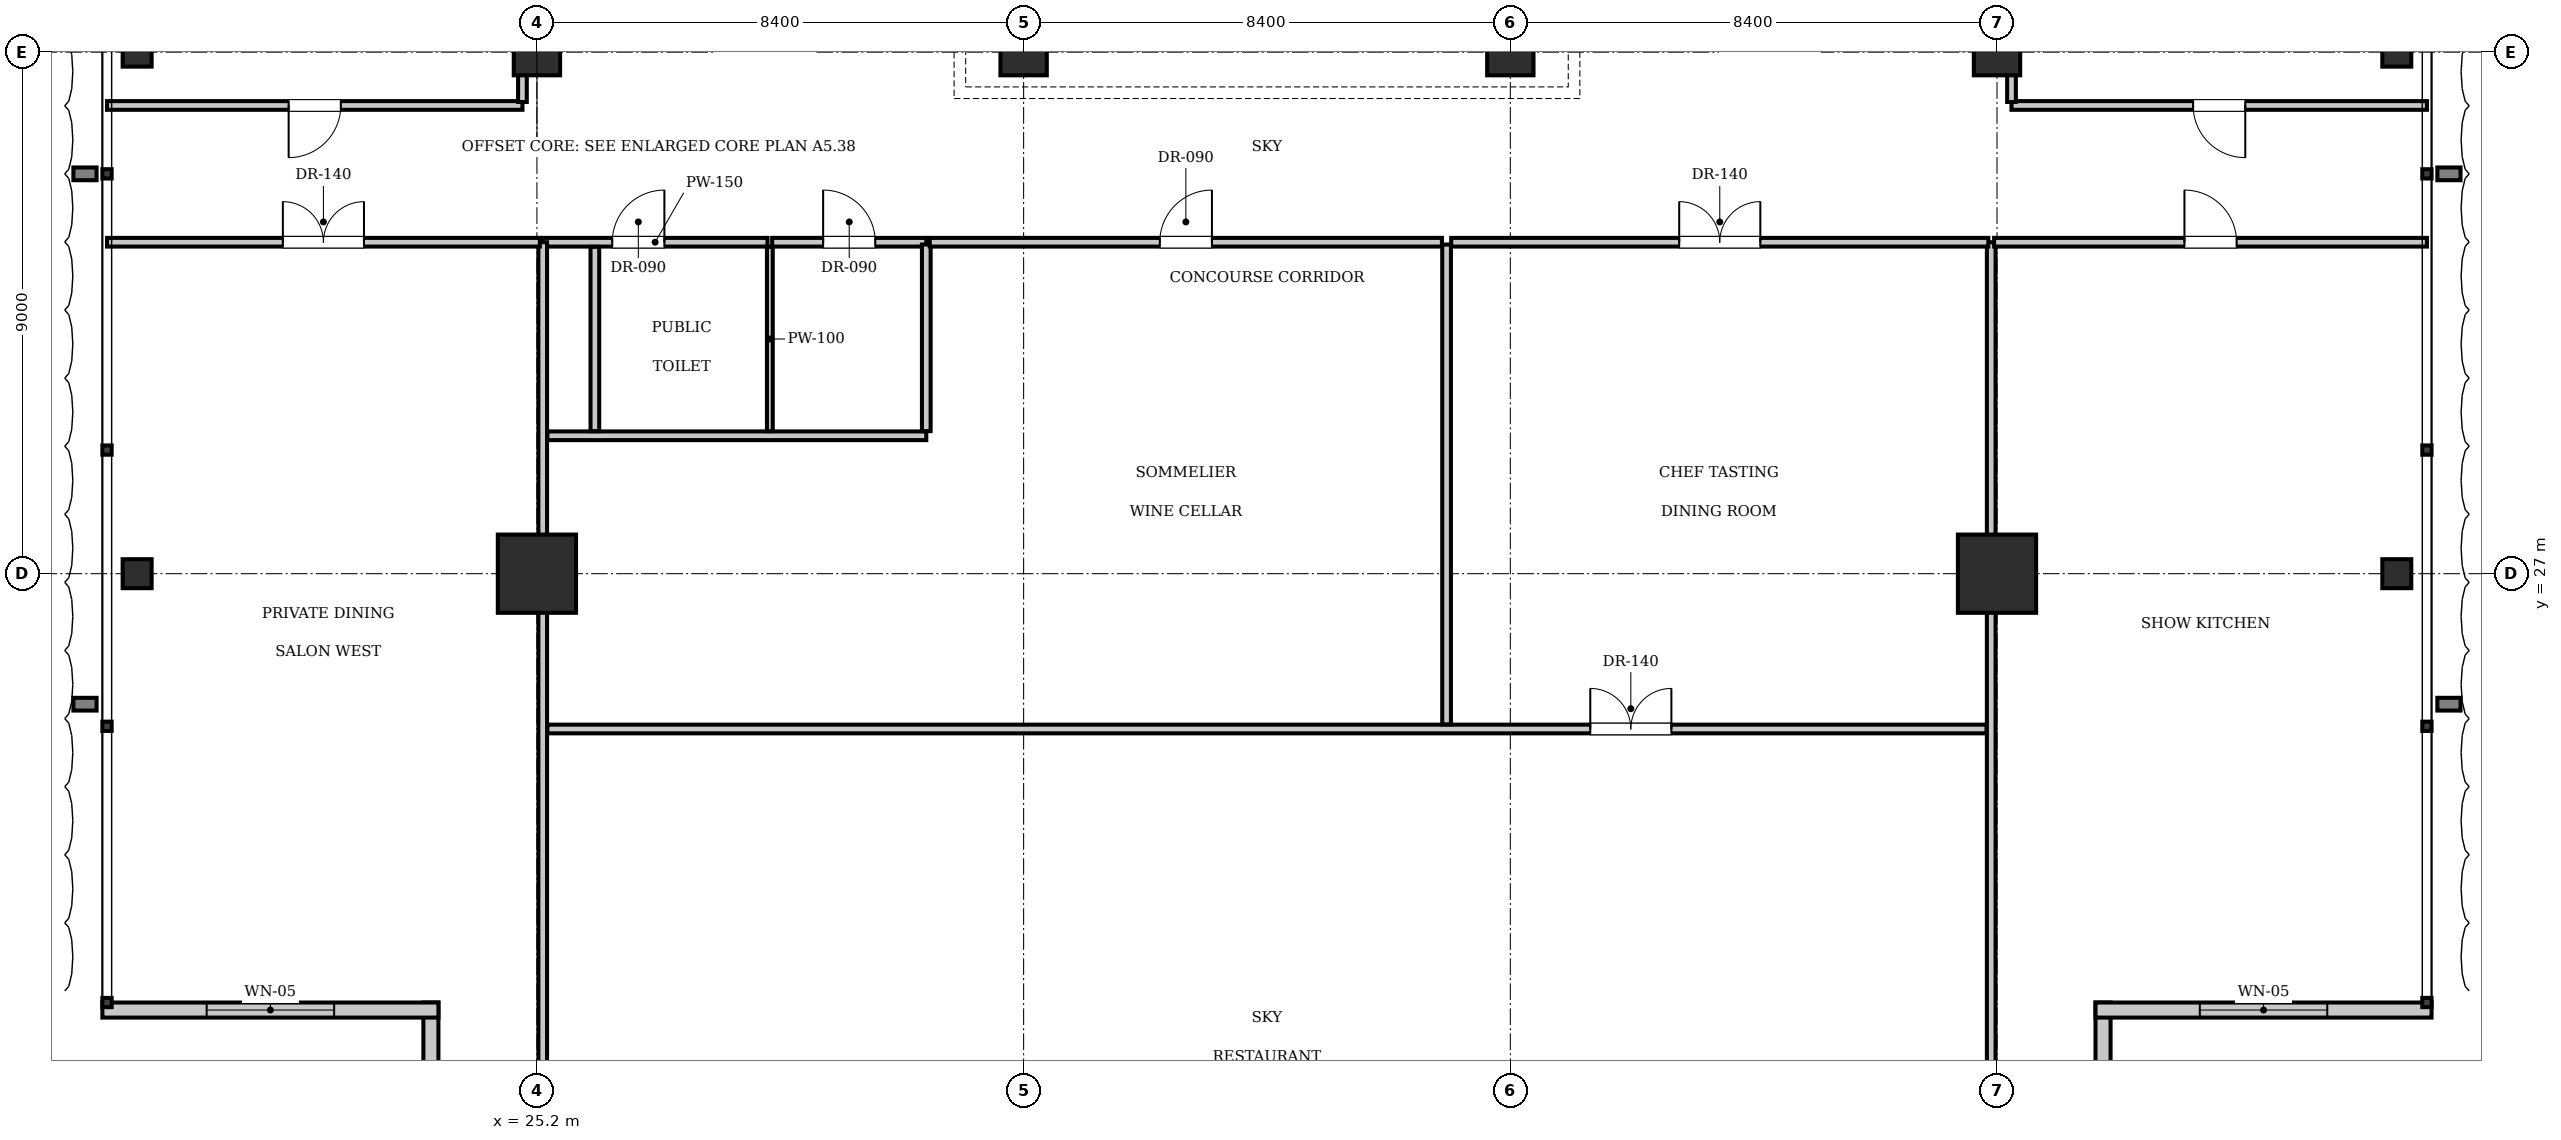
"""IFC4 building model, lengths in metres.
Left out: names, types, materials, properties, quantities, classifications, styles, units other than length and angle.
Written with IfcOpenShell. Run it as: python <this file> out.ifc"""

import sys

from ifc_helpers import new_model, si_unit, direction, frame, frame_2d, origin, origin_2d, place, context, subcontext, project, spatial, rectangle, i_section, extrude, element, fill, save


model = new_model("IFC4")
c1 = context("Model", 3, precision=1e-05, world=origin(), true_north=direction((0.0, 1.0)))
c2 = subcontext(c1, "Body", "Model", "MODEL_VIEW")
j1 = project(units=[si_unit("LENGTHUNIT", "METRE"), si_unit("PLANEANGLEUNIT", "RADIAN")], contexts=[c1])
p1 = place(None, origin())
s1 = spatial("IfcSite", under=j1, at=p1, CompositionType="ELEMENT")
p2 = place(p1, origin())
s2 = spatial("IfcBuilding", under=s1, at=p2, CompositionType="ELEMENT")
p3 = place(p2, frame((0.0, 0.0, 345.1)))
s3 = spatial("IfcBuildingStorey", under=s2, at=p3, CompositionType="ELEMENT", Elevation=345.1)
for number, where, z_axis, x_axis in (
    (1, (25.2, 27.0, 0.0), (0.0, 0.0, 1.0), (1.0, 0.0, 0.0)),
    (2, (50.4, 27.0, 0.0), (0.0, 0.0, 1.0), (1.0, 0.0, 0.0)),
):
    element("IfcColumn", number, at=place(p3, frame(where, z_axis=z_axis, x_axis=x_axis)), inside=s3, PredefinedType="COLUMN", context=c2, shape_type="SweptSolid", body=[
        extrude(rectangle(XDim=1.35, YDim=1.35, at=origin_2d()), origin(), (0.0, 0.0, 1.0), 4.55),
    ])
for number, where, z_axis, x_axis in (
    (3, (25.2, 36.0, 0.0), (0.0, 0.0, 1.0), (1.0, 0.0, 0.0)),
    (4, (33.6, 36.0, 0.0), (0.0, 0.0, 1.0), (1.0, 0.0, 0.0)),
    (5, (42.0, 36.0, 0.0), (0.0, 0.0, 1.0), (1.0, 0.0, 0.0)),
    (6, (50.4, 36.0, 0.0), (0.0, 0.0, 1.0), (1.0, 0.0, 0.0)),
):
    element("IfcColumn", number, at=place(p3, frame(where, z_axis=z_axis, x_axis=x_axis)), inside=s3, PredefinedType="COLUMN", context=c2, shape_type="SweptSolid", body=[
        extrude(rectangle(XDim=0.8, YDim=0.8, at=origin_2d()), origin(), (0.0, 0.0, 1.0), 4.55),
    ])
for number, where, z_axis, x_axis in (
    (7, (18.3, 27.0, 0.0), (0.0, 0.0, 1.0), (1.0, 0.0, 0.0)),
    (8, (57.3, 27.0, 0.0), (0.0, 0.0, 1.0), (1.0, 0.0, 0.0)),
    (9, (18.3, 36.0, 0.0), (0.0, 0.0, 1.0), (1.0, 0.0, 0.0)),
    (10, (57.3, 36.0, 0.0), (0.0, 0.0, 1.0), (1.0, 0.0, 0.0)),
):
    element("IfcColumn", number, at=place(p3, frame(where, z_axis=z_axis, x_axis=x_axis)), inside=s3, PredefinedType="COLUMN", context=c2, shape_type="SweptSolid", body=[
        extrude(i_section(OverallWidth=0.5, OverallDepth=0.5, WebThickness=0.022, FlangeThickness=0.032, at=origin_2d()), origin(), (0.0, 0.0, 1.0), 4.55),
    ])
p4 = place(p3, frame((23.37, 13.8, 0.0), z_axis=(0.0, 0.0, 1.0), x_axis=(0.0, 1.0, 0.0)))
e11 = element("IfcWall", 11, at=p4, inside=s3, PredefinedType="SOLIDWALL", context=c2, shape_type="SweptSolid", body=[
    extrude(rectangle(XDim=5.8, YDim=0.26, at=frame_2d((2.9, 0.0))), origin(), (0.0, 0.0, 1.0), 4.31),
])
p5 = place(p3, frame((23.5, 19.47, 0.0), z_axis=(0.0, 0.0, 1.0), x_axis=(-1.0, 0.0, 0.0)))
e12 = element("IfcWall", 12, at=p5, inside=s3, PredefinedType="SOLIDWALL", context=c2, shape_type="SweptSolid", body=[
    extrude(rectangle(XDim=5.8, YDim=0.26, at=frame_2d((2.9, 0.0))), origin(), (0.0, 0.0, 1.0), 4.31),
])
p6 = place(p5, frame((1.8, 0.0, 0.9)))
e13 = element("IfcOpeningElement", 13, at=p6, cuts=e12, PredefinedType="OPENING", context=c2, shape_type="SweptSolid", body=[
    extrude(rectangle(XDim=2.2, YDim=2.8, at=frame_2d((1.1, 1.4))), frame((0.0, 0.14, 0.0), z_axis=(0.0, -1.0, 0.0), x_axis=(1.0, 0.0, 0.0)), (0.0, 0.0, 1.0), 0.28),
])
p7 = place(p3, frame((52.23, 19.6, 0.0), z_axis=(0.0, 0.0, 1.0), x_axis=(0.0, -1.0, 0.0)))
e14 = element("IfcWall", 14, at=p7, inside=s3, PredefinedType="SOLIDWALL", context=c2, shape_type="SweptSolid", body=[
    extrude(rectangle(XDim=5.8, YDim=0.26, at=frame_2d((2.9, 0.0))), origin(), (0.0, 0.0, 1.0), 4.31),
])
p8 = place(p3, frame((57.9, 19.47, 0.0), z_axis=(0.0, 0.0, 1.0), x_axis=(-1.0, 0.0, 0.0)))
e15 = element("IfcWall", 15, at=p8, inside=s3, PredefinedType="SOLIDWALL", context=c2, shape_type="SweptSolid", body=[
    extrude(rectangle(XDim=5.8, YDim=0.26, at=frame_2d((2.9, 0.0))), origin(), (0.0, 0.0, 1.0), 4.31),
])
p9 = place(p8, frame((1.8, 0.0, 0.9)))
e16 = element("IfcOpeningElement", 16, at=p9, cuts=e15, PredefinedType="OPENING", context=c2, shape_type="SweptSolid", body=[
    extrude(rectangle(XDim=2.2, YDim=2.8, at=frame_2d((1.1, 1.4))), frame((0.0, 0.14, 0.0), z_axis=(0.0, -1.0, 0.0), x_axis=(1.0, 0.0, 0.0)), (0.0, 0.0, 1.0), 0.28),
])
p10 = place(p3, frame((25.3, 32.72, 0.0), z_axis=(0.0, 0.0, 1.0), x_axis=(1.0, 0.0, 0.0)))
e17 = element("IfcWall", 17, at=p10, inside=s3, PredefinedType="PARTITIONING", context=c2, shape_type="SweptSolid", body=[
    extrude(rectangle(XDim=3.88, YDim=0.15, at=frame_2d((1.94, 0.0))), origin(), (0.0, 0.0, 1.0), 4.31),
])
p11 = place(p10, frame((1.2, 0.0, 0.0)))
e18 = element("IfcOpeningElement", 18, at=p11, cuts=e17, PredefinedType="OPENING", context=c2, shape_type="SweptSolid", body=[
    extrude(rectangle(XDim=0.9, YDim=2.1, at=frame_2d((0.45, 1.05))), frame((0.0, 0.085, 0.0), z_axis=(0.0, -1.0, 0.0), x_axis=(1.0, 0.0, 0.0)), (0.0, 0.0, 1.0), 0.17),
])
p12 = place(p3, frame((29.26, 32.72, 0.0), z_axis=(0.0, 0.0, 1.0), x_axis=(1.0, 0.0, 0.0)))
e19 = element("IfcWall", 19, at=p12, inside=s3, PredefinedType="PARTITIONING", context=c2, shape_type="SweptSolid", body=[
    extrude(rectangle(XDim=2.66, YDim=0.15, at=frame_2d((1.33, 0.0))), origin(), (0.0, 0.0, 1.0), 4.31),
])
p13 = place(p12, frame((0.88, 0.0, 0.0)))
e20 = element("IfcOpeningElement", 20, at=p13, cuts=e19, PredefinedType="OPENING", context=c2, shape_type="SweptSolid", body=[
    extrude(rectangle(XDim=0.9, YDim=2.1, at=frame_2d((0.45, 1.05))), frame((0.0, 0.085, 0.0), z_axis=(0.0, -1.0, 0.0), x_axis=(1.0, 0.0, 0.0)), (0.0, 0.0, 1.0), 0.17),
])
p14 = place(p3, frame((25.38, 29.38, 0.0), z_axis=(0.0, 0.0, 1.0), x_axis=(1.0, 0.0, 0.0)))
e21 = element("IfcWall", 21, at=p14, inside=s3, PredefinedType="PARTITIONING", context=c2, shape_type="SweptSolid", body=[
    extrude(rectangle(XDim=6.54, YDim=0.15, at=frame_2d((3.27, 0.0))), origin(), (0.0, 0.0, 1.0), 4.31),
])
p15 = place(p3, frame((26.2, 29.46, 0.0), z_axis=(0.0, 0.0, 1.0), x_axis=(0.0, 1.0, 0.0)))
e22 = element("IfcWall", 22, at=p15, inside=s3, PredefinedType="PARTITIONING", context=c2, shape_type="SweptSolid", body=[
    extrude(rectangle(XDim=3.18, YDim=0.15, at=frame_2d((1.59, 0.0))), origin(), (0.0, 0.0, 1.0), 4.31),
])
p16 = place(p3, frame((29.22, 29.46, 0.0), z_axis=(0.0, 0.0, 1.0), x_axis=(0.0, 1.0, 0.0)))
e23 = element("IfcWall", 23, at=p16, inside=s3, PredefinedType="PARTITIONING", context=c2, shape_type="SweptSolid", body=[
    extrude(rectangle(XDim=3.18, YDim=0.1, at=frame_2d((1.59, 0.0))), origin(), (0.0, 0.0, 1.0), 4.31),
])
p17 = place(p3, frame((31.92, 29.46, 0.0), z_axis=(0.0, 0.0, 1.0), x_axis=(0.0, 1.0, 0.0)))
e24 = element("IfcWall", 24, at=p17, inside=s3, PredefinedType="PARTITIONING", context=c2, shape_type="SweptSolid", body=[
    extrude(rectangle(XDim=3.22, YDim=0.15, at=frame_2d((1.61, 0.0))), origin(), (0.0, 0.0, 1.0), 4.31),
])
p18 = place(p3, frame((25.38, 24.32, 0.0), z_axis=(0.0, 0.0, 1.0), x_axis=(1.0, 0.0, 0.0)))
e25 = element("IfcWall", 25, at=p18, inside=s3, PredefinedType="PARTITIONING", context=c2, shape_type="SweptSolid", body=[
    extrude(rectangle(XDim=24.84, YDim=0.15, at=frame_2d((12.42, 0.0))), origin(), (0.0, 0.0, 1.0), 4.31),
])
p19 = place(p18, frame((18.0, 0.0, 0.0)))
e26 = element("IfcOpeningElement", 26, at=p19, cuts=e25, PredefinedType="OPENING", context=c2, shape_type="SweptSolid", body=[
    extrude(rectangle(XDim=1.4, YDim=2.2, at=frame_2d((0.7, 1.1))), frame((0.0, 0.085, 0.0), z_axis=(0.0, -1.0, 0.0), x_axis=(1.0, 0.0, 0.0)), (0.0, 0.0, 1.0), 0.17),
])
p20 = place(p3, frame((40.9, 24.4, 0.0), z_axis=(0.0, 0.0, 1.0), x_axis=(0.0, 1.0, 0.0)))
e27 = element("IfcWall", 27, at=p20, inside=s3, PredefinedType="PARTITIONING", context=c2, shape_type="SweptSolid", body=[
    extrude(rectangle(XDim=8.28, YDim=0.15, at=frame_2d((4.14, 0.0))), origin(), (0.0, 0.0, 1.0), 4.31),
])
for number, where, z_axis, x_axis in (
    (28, (25.3, 13.88, 0.0), (0.0, 0.0, 1.0), (0.0, 1.0, 0.0)),
    (29, (50.3, 13.88, 0.0), (0.0, 0.0, 1.0), (0.0, 1.0, 0.0)),
):
    element("IfcWall", number, at=place(p3, frame(where, z_axis=z_axis, x_axis=x_axis)), inside=s3, PredefinedType="PARTITIONING", context=c2, shape_type="SweptSolid", body=[
        extrude(rectangle(XDim=18.84, YDim=0.15, at=frame_2d((9.42, 0.0))), origin(), (0.0, 0.0, 1.0), 3.841),
    ])
p21 = place(p3, frame((17.78, 32.72, 0.0), z_axis=(0.0, 0.0, 1.0), x_axis=(1.0, 0.0, 0.0)))
e30 = element("IfcWall", 30, at=p21, inside=s3, PredefinedType="PARTITIONING", context=c2, shape_type="SweptSolid", body=[
    extrude(rectangle(XDim=7.47, YDim=0.15, at=frame_2d((3.735, 0.0))), origin(), (0.0, 0.0, 1.0), 4.31),
])
p22 = place(p21, frame((3.035, 0.0, 0.0)))
e31 = element("IfcOpeningElement", 31, at=p22, cuts=e30, PredefinedType="OPENING", context=c2, shape_type="SweptSolid", body=[
    extrude(rectangle(XDim=1.4, YDim=2.2, at=frame_2d((0.7, 1.1))), frame((0.0, 0.085, 0.0), z_axis=(0.0, -1.0, 0.0), x_axis=(1.0, 0.0, 0.0)), (0.0, 0.0, 1.0), 0.17),
])
p23 = place(p3, frame((31.98, 32.72, 0.0), z_axis=(0.0, 0.0, 1.0), x_axis=(1.0, 0.0, 0.0)))
e32 = element("IfcWall", 32, at=p23, inside=s3, PredefinedType="PARTITIONING", context=c2, shape_type="SweptSolid", body=[
    extrude(rectangle(XDim=8.84, YDim=0.15, at=frame_2d((4.42, 0.0))), origin(), (0.0, 0.0, 1.0), 4.31),
])
p24 = place(p23, frame((3.97, 0.0, 0.0)))
e33 = element("IfcOpeningElement", 33, at=p24, cuts=e32, PredefinedType="OPENING", context=c2, shape_type="SweptSolid", body=[
    extrude(rectangle(XDim=0.9, YDim=2.1, at=frame_2d((0.45, 1.05))), frame((0.0, 0.085, 0.0), z_axis=(0.0, -1.0, 0.0), x_axis=(1.0, 0.0, 0.0)), (0.0, 0.0, 1.0), 0.17),
])
p25 = place(p3, frame((40.98, 32.72, 0.0), z_axis=(0.0, 0.0, 1.0), x_axis=(1.0, 0.0, 0.0)))
e34 = element("IfcWall", 34, at=p25, inside=s3, PredefinedType="PARTITIONING", context=c2, shape_type="SweptSolid", body=[
    extrude(rectangle(XDim=9.27, YDim=0.15, at=frame_2d((4.635, 0.0))), origin(), (0.0, 0.0, 1.0), 4.31),
])
p26 = place(p25, frame((3.935, 0.0, 0.0)))
e35 = element("IfcOpeningElement", 35, at=p26, cuts=e34, PredefinedType="OPENING", context=c2, shape_type="SweptSolid", body=[
    extrude(rectangle(XDim=1.4, YDim=2.2, at=frame_2d((0.7, 1.1))), frame((0.0, 0.085, 0.0), z_axis=(0.0, -1.0, 0.0), x_axis=(1.0, 0.0, 0.0)), (0.0, 0.0, 1.0), 0.17),
])
p27 = place(p3, frame((50.35, 32.72, 0.0), z_axis=(0.0, 0.0, 1.0), x_axis=(1.0, 0.0, 0.0)))
e36 = element("IfcWall", 36, at=p27, inside=s3, PredefinedType="PARTITIONING", context=c2, shape_type="SweptSolid", body=[
    extrude(rectangle(XDim=7.47, YDim=0.15, at=frame_2d((3.735, 0.0))), origin(), (0.0, 0.0, 1.0), 4.31),
])
p28 = place(p27, frame((3.285, 0.0, 0.0)))
e37 = element("IfcOpeningElement", 37, at=p28, cuts=e36, PredefinedType="OPENING", context=c2, shape_type="SweptSolid", body=[
    extrude(rectangle(XDim=0.9, YDim=2.1, at=frame_2d((0.45, 1.05))), frame((0.0, 0.085, 0.0), z_axis=(0.0, -1.0, 0.0), x_axis=(1.0, 0.0, 0.0)), (0.0, 0.0, 1.0), 0.17),
])
p29 = place(p3, frame((17.78, 35.08, 0.0), z_axis=(0.0, 0.0, 1.0), x_axis=(1.0, 0.0, 0.0)))
e38 = element("IfcWall", 38, at=p29, inside=s3, PredefinedType="PARTITIONING", context=c2, shape_type="SweptSolid", body=[
    extrude(rectangle(XDim=7.17, YDim=0.15, at=frame_2d((3.585, 0.0))), origin(), (0.0, 0.0, 1.0), 4.31),
])
p30 = place(p29, frame((3.135, 0.0, 0.0)))
e39 = element("IfcOpeningElement", 39, at=p30, cuts=e38, PredefinedType="OPENING", context=c2, shape_type="SweptSolid", body=[
    extrude(rectangle(XDim=0.9, YDim=2.1, at=frame_2d((0.45, 1.05))), frame((0.0, 0.085, 0.0), z_axis=(0.0, -1.0, 0.0), x_axis=(1.0, 0.0, 0.0)), (0.0, 0.0, 1.0), 0.17),
])
p31 = place(p3, frame((24.95, 35.14, 0.0), z_axis=(0.0, 0.0, 1.0), x_axis=(0.0, 1.0, 0.0)))
e40 = element("IfcWall", 40, at=p31, inside=s3, PredefinedType="PARTITIONING", context=c2, shape_type="SweptSolid", body=[
    extrude(rectangle(XDim=18.78, YDim=0.15, at=frame_2d((9.39, 0.0))), origin(), (0.0, 0.0, 1.0), 4.31),
])
p32 = place(p3, frame((50.65, 35.08, 0.0), z_axis=(0.0, 0.0, 1.0), x_axis=(1.0, 0.0, 0.0)))
e41 = element("IfcWall", 41, at=p32, inside=s3, PredefinedType="PARTITIONING", context=c2, shape_type="SweptSolid", body=[
    extrude(rectangle(XDim=7.17, YDim=0.15, at=frame_2d((3.585, 0.0))), origin(), (0.0, 0.0, 1.0), 4.31),
])
p33 = place(p32, frame((3.135, 0.0, 0.0)))
e42 = element("IfcOpeningElement", 42, at=p33, cuts=e41, PredefinedType="OPENING", context=c2, shape_type="SweptSolid", body=[
    extrude(rectangle(XDim=0.9, YDim=2.1, at=frame_2d((0.45, 1.05))), frame((0.0, 0.085, 0.0), z_axis=(0.0, -1.0, 0.0), x_axis=(1.0, 0.0, 0.0)), (0.0, 0.0, 1.0), 0.17),
])
p34 = place(p3, frame((50.65, 35.14, 0.0), z_axis=(0.0, 0.0, 1.0), x_axis=(0.0, 1.0, 0.0)))
e43 = element("IfcWall", 43, at=p34, inside=s3, PredefinedType="PARTITIONING", context=c2, shape_type="SweptSolid", body=[
    extrude(rectangle(XDim=18.78, YDim=0.15, at=frame_2d((9.39, 0.0))), origin(), (0.0, 0.0, 1.0), 4.31),
])
p35 = place(p6, origin())
e44 = element("IfcWindow", 44, at=p35, inside=s3, PartitioningType="SINGLE_PANEL", PredefinedType="WINDOW", context=c2, shape_type="SweptSolid", body=[
    extrude(rectangle(XDim=2.2, YDim=2.8, at=frame_2d((1.1, 1.4))), frame((0.0, 0.03, 0.0), z_axis=(0.0, -1.0, 0.0), x_axis=(1.0, 0.0, 0.0)), (0.0, 0.0, 1.0), 0.06),
])
fill(e13, e44)
p36 = place(p9, origin())
e45 = element("IfcWindow", 45, at=p36, inside=s3, PartitioningType="SINGLE_PANEL", PredefinedType="WINDOW", context=c2, shape_type="SweptSolid", body=[
    extrude(rectangle(XDim=2.2, YDim=2.8, at=frame_2d((1.1, 1.4))), frame((0.0, 0.03, 0.0), z_axis=(0.0, -1.0, 0.0), x_axis=(1.0, 0.0, 0.0)), (0.0, 0.0, 1.0), 0.06),
])
fill(e16, e45)
p37 = place(p11, origin())
e46 = element("IfcDoor", 46, at=p37, inside=s3, OperationType="SINGLE_SWING_RIGHT", PredefinedType="DOOR", context=c2, shape_type="SweptSolid", body=[
    extrude(rectangle(XDim=0.9, YDim=2.1, at=frame_2d((0.45, 1.05))), frame((0.0, 0.025, 0.0), z_axis=(0.0, -1.0, 0.0), x_axis=(1.0, 0.0, 0.0)), (0.0, 0.0, 1.0), 0.05),
])
fill(e18, e46)
p38 = place(p13, origin())
e47 = element("IfcDoor", 47, at=p38, inside=s3, OperationType="SINGLE_SWING_LEFT", PredefinedType="DOOR", context=c2, shape_type="SweptSolid", body=[
    extrude(rectangle(XDim=0.9, YDim=2.1, at=frame_2d((0.45, 1.05))), frame((0.0, 0.025, 0.0), z_axis=(0.0, -1.0, 0.0), x_axis=(1.0, 0.0, 0.0)), (0.0, 0.0, 1.0), 0.05),
])
fill(e20, e47)
p39 = place(p19, origin())
e48 = element("IfcDoor", 48, at=p39, inside=s3, OperationType="DOUBLE_DOOR_SINGLE_SWING", PredefinedType="DOOR", context=c2, shape_type="SweptSolid", body=[
    extrude(rectangle(XDim=1.4, YDim=2.2, at=frame_2d((0.7, 1.1))), frame((0.0, 0.025, 0.0), z_axis=(0.0, -1.0, 0.0), x_axis=(1.0, 0.0, 0.0)), (0.0, 0.0, 1.0), 0.05),
])
fill(e26, e48)
p40 = place(p22, origin())
e49 = element("IfcDoor", 49, at=p40, inside=s3, OperationType="DOUBLE_DOOR_SINGLE_SWING", PredefinedType="DOOR", context=c2, shape_type="SweptSolid", body=[
    extrude(rectangle(XDim=1.4, YDim=2.2, at=frame_2d((0.7, 1.1))), frame((0.0, 0.025, 0.0), z_axis=(0.0, -1.0, 0.0), x_axis=(1.0, 0.0, 0.0)), (0.0, 0.0, 1.0), 0.05),
])
fill(e31, e49)
p41 = place(p24, origin())
e50 = element("IfcDoor", 50, at=p41, inside=s3, OperationType="SINGLE_SWING_RIGHT", PredefinedType="DOOR", context=c2, shape_type="SweptSolid", body=[
    extrude(rectangle(XDim=0.9, YDim=2.1, at=frame_2d((0.45, 1.05))), frame((0.0, 0.025, 0.0), z_axis=(0.0, -1.0, 0.0), x_axis=(1.0, 0.0, 0.0)), (0.0, 0.0, 1.0), 0.05),
])
fill(e33, e50)
p42 = place(p26, origin())
e51 = element("IfcDoor", 51, at=p42, inside=s3, OperationType="DOUBLE_DOOR_SINGLE_SWING", PredefinedType="DOOR", context=c2, shape_type="SweptSolid", body=[
    extrude(rectangle(XDim=1.4, YDim=2.2, at=frame_2d((0.7, 1.1))), frame((0.0, 0.025, 0.0), z_axis=(0.0, -1.0, 0.0), x_axis=(1.0, 0.0, 0.0)), (0.0, 0.0, 1.0), 0.05),
])
fill(e35, e51)
p43 = place(p28, origin())
e52 = element("IfcDoor", 52, at=p43, inside=s3, OperationType="SINGLE_SWING_LEFT", PredefinedType="DOOR", context=c2, shape_type="SweptSolid", body=[
    extrude(rectangle(XDim=0.9, YDim=2.1, at=frame_2d((0.45, 1.05))), frame((0.0, 0.025, 0.0), z_axis=(0.0, -1.0, 0.0), x_axis=(1.0, 0.0, 0.0)), (0.0, 0.0, 1.0), 0.05),
])
fill(e37, e52)
p44 = place(p30, frame((0.9, 0.0, 0.0), z_axis=(0.0, 0.0, 1.0), x_axis=(-1.0, 0.0, 0.0)))
e53 = element("IfcDoor", 53, at=p44, inside=s3, OperationType="SINGLE_SWING_RIGHT", PredefinedType="DOOR", context=c2, shape_type="SweptSolid", body=[
    extrude(rectangle(XDim=0.9, YDim=2.1, at=frame_2d((0.45, 1.05))), frame((0.0, 0.025, 0.0), z_axis=(0.0, -1.0, 0.0), x_axis=(1.0, 0.0, 0.0)), (0.0, 0.0, 1.0), 0.05),
])
fill(e39, e53)
p45 = place(p33, frame((0.9, 0.0, 0.0), z_axis=(0.0, 0.0, 1.0), x_axis=(-1.0, 0.0, 0.0)))
e54 = element("IfcDoor", 54, at=p45, inside=s3, OperationType="SINGLE_SWING_LEFT", PredefinedType="DOOR", context=c2, shape_type="SweptSolid", body=[
    extrude(rectangle(XDim=0.9, YDim=2.1, at=frame_2d((0.45, 1.05))), frame((0.0, 0.025, 0.0), z_axis=(0.0, -1.0, 0.0), x_axis=(1.0, 0.0, 0.0)), (0.0, 0.0, 1.0), 0.05),
])
fill(e42, e54)
save(model, sys.argv[1])
